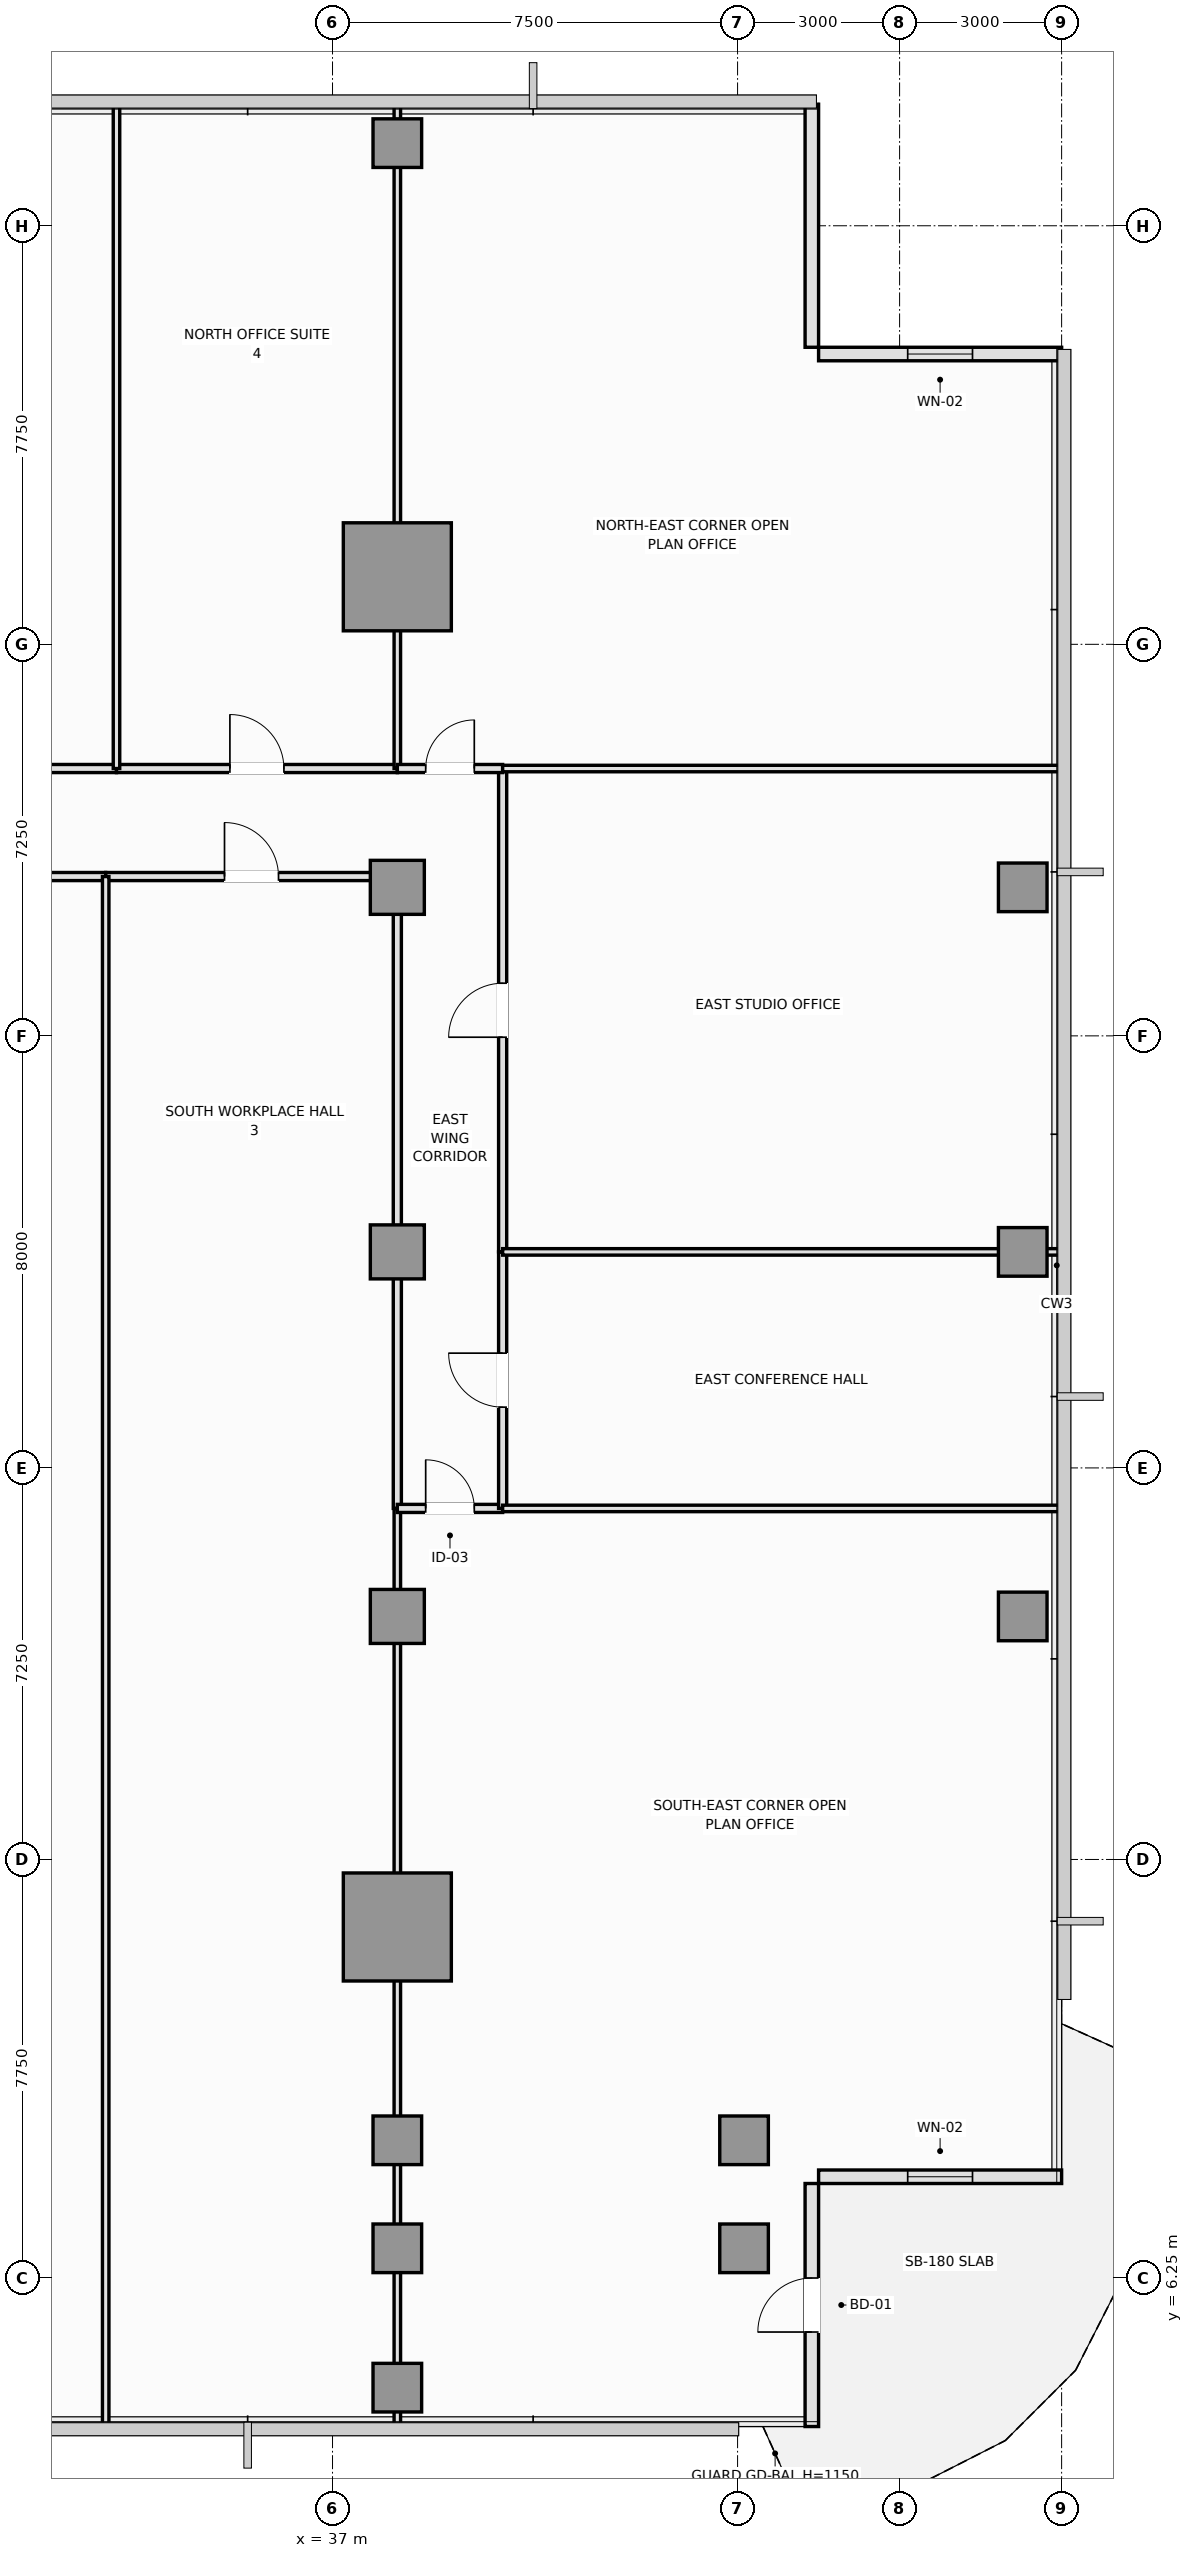
"""IFC4 building model, lengths in metres.
Left out: names, types, materials, properties, quantities, classifications, styles, units other than length and angle.
Written with IfcOpenShell. Run it as: python <this file> out.ifc"""

import sys

from ifc_helpers import new_model, si_unit, direction, frame, frame_2d, origin, origin_2d, place, context, subcontext, project, spatial, rectangle, extrude, element, fill, save


model = new_model("IFC4")
c1 = context("Model", 3, precision=1e-05, world=origin(), true_north=direction((0.0, 1.0)))
c2 = subcontext(c1, "Body", "Model", "MODEL_VIEW")
j1 = project(units=[si_unit("LENGTHUNIT", "METRE"), si_unit("PLANEANGLEUNIT", "RADIAN")], contexts=[c1])
p1 = place(None, origin())
s1 = spatial("IfcSite", under=j1, at=p1, CompositionType="ELEMENT")
p2 = place(p1, origin())
s2 = spatial("IfcBuilding", under=s1, at=p2, CompositionType="ELEMENT")
p3 = place(p2, frame((0.0, 0.0, 116.45)))
s3 = spatial("IfcBuildingStorey", under=s2, at=p3, CompositionType="ELEMENT", Elevation=116.45)
for number, where, z_axis, x_axis in (
    (1, (38.2, 12.75, 0.0), (0.0, 0.0, 1.0), (1.0, 0.0, 0.0)),
    (2, (38.2, 37.75, 0.0), (0.0, 0.0, 1.0), (1.0, 0.0, 0.0)),
):
    element("IfcColumn", number, at=place(p3, frame(where, z_axis=z_axis, x_axis=x_axis)), inside=s3, PredefinedType="COLUMN", context=c2, shape_type="SweptSolid", body=[
        extrude(rectangle(XDim=2.0, YDim=2.0, at=origin_2d()), origin(), (0.0, 0.0, 1.0), 3.55),
    ])
for number, where, z_axis, x_axis in (
    (3, (38.2, 18.5, 0.0), (0.0, 0.0, 1.0), (1.0, 0.0, 0.0)),
    (4, (38.2, 25.25, 0.0), (0.0, 0.0, 1.0), (1.0, 0.0, 0.0)),
    (5, (38.2, 32.0, 0.0), (0.0, 0.0, 1.0), (1.0, 0.0, 0.0)),
):
    element("IfcColumn", number, at=place(p3, frame(where, z_axis=z_axis, x_axis=x_axis)), inside=s3, PredefinedType="COLUMN", context=c2, shape_type="SweptSolid", body=[
        extrude(rectangle(XDim=1.0, YDim=1.0, at=origin_2d()), origin(), (0.0, 0.0, 1.0), 3.55),
    ])
for number, where, z_axis, x_axis in (
    (6, (38.2, 6.8, 0.0), (0.0, 0.0, 1.0), (1.0, 0.0, 0.0)),
    (7, (38.2, 8.8, 0.0), (0.0, 0.0, 1.0), (1.0, 0.0, 0.0)),
    (8, (44.62, 6.8, 0.0), (0.0, 0.0, 1.0), (1.0, 0.0, 0.0)),
    (9, (44.62, 8.8, 0.0), (0.0, 0.0, 1.0), (1.0, 0.0, 0.0)),
    (10, (49.78, 18.5, 0.0), (0.0, 0.0, 1.0), (1.0, 0.0, 0.0)),
    (11, (49.78, 25.25, 0.0), (0.0, 0.0, 1.0), (1.0, 0.0, 0.0)),
    (12, (49.78, 32.0, 0.0), (0.0, 0.0, 1.0), (1.0, 0.0, 0.0)),
    (13, (38.2, 4.22, 0.0), (0.0, 0.0, 1.0), (1.0, 0.0, 0.0)),
    (14, (38.2, 45.78, 0.0), (0.0, 0.0, 1.0), (1.0, 0.0, 0.0)),
):
    element("IfcColumn", number, at=place(p3, frame(where, z_axis=z_axis, x_axis=x_axis)), inside=s3, PredefinedType="COLUMN", context=c2, shape_type="SweptSolid", body=[
        extrude(rectangle(XDim=0.9, YDim=0.9, at=origin_2d()), origin(), (0.0, 0.0, 1.0), 3.55),
    ])
p4 = place(p3, frame((45.875, 3.5, 0.0), z_axis=(0.0, 0.0, 1.0), x_axis=(0.0, 1.0, 0.0)))
e15 = element("IfcWall", 15, at=p4, inside=s3, PredefinedType="SOLIDWALL", context=c2, shape_type="SweptSolid", body=[
    extrude(rectangle(XDim=4.5, YDim=0.25, at=frame_2d((2.25, 0.0))), origin(), (0.0, 0.0, 1.0), 3.07),
])
p5 = place(p4, frame((1.75, 0.0, 0.0)))
e16 = element("IfcOpeningElement", 16, at=p5, cuts=e15, PredefinedType="OPENING", context=c2, shape_type="SweptSolid", body=[
    extrude(rectangle(XDim=1.0, YDim=2.2, at=frame_2d((0.5, 1.1))), frame((0.0, 0.135, 0.0), z_axis=(0.0, -1.0, 0.0), x_axis=(1.0, 0.0, 0.0)), (0.0, 0.0, 1.0), 0.27),
])
p6 = place(p3, frame((46.0, 8.125, 0.0), z_axis=(0.0, 0.0, 1.0), x_axis=(1.0, 0.0, 0.0)))
e17 = element("IfcWall", 17, at=p6, inside=s3, PredefinedType="SOLIDWALL", context=c2, shape_type="SweptSolid", body=[
    extrude(rectangle(XDim=4.5, YDim=0.25, at=frame_2d((2.25, 0.0))), origin(), (0.0, 0.0, 1.0), 3.1),
])
p7 = place(p6, frame((1.65, 0.0, 0.9)))
e18 = element("IfcOpeningElement", 18, at=p7, cuts=e17, PredefinedType="OPENING", context=c2, shape_type="SweptSolid", body=[
    extrude(rectangle(XDim=1.2, YDim=1.8, at=frame_2d((0.6, 0.9))), frame((0.0, 0.135, 0.0), z_axis=(0.0, -1.0, 0.0), x_axis=(1.0, 0.0, 0.0)), (0.0, 0.0, 1.0), 0.27),
])
p8 = place(p3, frame((50.5, 41.875, 0.0), z_axis=(0.0, 0.0, 1.0), x_axis=(-1.0, 0.0, 0.0)))
e19 = element("IfcWall", 19, at=p8, inside=s3, PredefinedType="SOLIDWALL", context=c2, shape_type="SweptSolid", body=[
    extrude(rectangle(XDim=4.5, YDim=0.25, at=frame_2d((2.25, 0.0))), origin(), (0.0, 0.0, 1.0), 3.37),
])
p9 = place(p8, frame((1.65, 0.0, 0.9)))
e20 = element("IfcOpeningElement", 20, at=p9, cuts=e19, PredefinedType="OPENING", context=c2, shape_type="SweptSolid", body=[
    extrude(rectangle(XDim=1.2, YDim=1.8, at=frame_2d((0.6, 0.9))), frame((0.0, 0.135, 0.0), z_axis=(0.0, -1.0, 0.0), x_axis=(1.0, 0.0, 0.0)), (0.0, 0.0, 1.0), 0.27),
])
p10 = place(p3, frame((45.875, 42.0, 0.0), z_axis=(0.0, 0.0, 1.0), x_axis=(0.0, 1.0, 0.0)))
e21 = element("IfcWall", 21, at=p10, inside=s3, PredefinedType="SOLIDWALL", context=c2, shape_type="SweptSolid", body=[
    extrude(rectangle(XDim=4.5, YDim=0.25, at=frame_2d((2.25, 0.0))), origin(), (0.0, 0.0, 1.0), 3.37),
])
p11 = place(p3, frame((27.5, 32.2, 0.0), z_axis=(0.0, 0.0, 1.0), x_axis=(1.0, 0.0, 0.0)))
e22 = element("IfcWall", 22, at=p11, inside=s3, PredefinedType="PARTITIONING", context=c2, shape_type="SweptSolid", body=[
    extrude(rectangle(XDim=5.3, YDim=0.15, at=frame_2d((2.65, 0.0))), origin(), (0.0, 0.0, 1.0), 3.37),
])
p12 = place(p11, frame((2.15, 0.0, 0.0)))
e23 = element("IfcOpeningElement", 23, at=p12, cuts=e22, PredefinedType="OPENING", context=c2, shape_type="SweptSolid", body=[
    extrude(rectangle(XDim=1.0, YDim=2.15, at=frame_2d((0.5, 1.075))), frame((0.0, 0.085, 0.0), z_axis=(0.0, -1.0, 0.0), x_axis=(1.0, 0.0, 0.0)), (0.0, 0.0, 1.0), 0.17),
])
p13 = place(p3, frame((32.8, 32.2, 0.0), z_axis=(0.0, 0.0, 1.0), x_axis=(1.0, 0.0, 0.0)))
e24 = element("IfcWall", 24, at=p13, inside=s3, PredefinedType="PARTITIONING", context=c2, shape_type="SweptSolid", body=[
    extrude(rectangle(XDim=5.4, YDim=0.15, at=frame_2d((2.7, 0.0))), origin(), (0.0, 0.0, 1.0), 3.37),
])
p14 = place(p13, frame((2.2, 0.0, 0.0)))
e25 = element("IfcOpeningElement", 25, at=p14, cuts=e24, PredefinedType="OPENING", context=c2, shape_type="SweptSolid", body=[
    extrude(rectangle(XDim=1.0, YDim=2.15, at=frame_2d((0.5, 1.075))), frame((0.0, 0.085, 0.0), z_axis=(0.0, -1.0, 0.0), x_axis=(1.0, 0.0, 0.0)), (0.0, 0.0, 1.0), 0.17),
])
p15 = place(p3, frame((27.5, 34.2, 0.0), z_axis=(0.0, 0.0, 1.0), x_axis=(1.0, 0.0, 0.0)))
e26 = element("IfcWall", 26, at=p15, inside=s3, PredefinedType="PARTITIONING", context=c2, shape_type="SweptSolid", body=[
    extrude(rectangle(XDim=5.5, YDim=0.15, at=frame_2d((2.75, 0.0))), origin(), (0.0, 0.0, 1.0), 3.37),
])
p16 = place(p15, frame((2.25, 0.0, 0.0)))
e27 = element("IfcOpeningElement", 27, at=p16, cuts=e26, PredefinedType="OPENING", context=c2, shape_type="SweptSolid", body=[
    extrude(rectangle(XDim=1.0, YDim=2.15, at=frame_2d((0.5, 1.075))), frame((0.0, 0.085, 0.0), z_axis=(0.0, -1.0, 0.0), x_axis=(1.0, 0.0, 0.0)), (0.0, 0.0, 1.0), 0.17),
])
p17 = place(p3, frame((33.0, 34.2, 0.0), z_axis=(0.0, 0.0, 1.0), x_axis=(1.0, 0.0, 0.0)))
e28 = element("IfcWall", 28, at=p17, inside=s3, PredefinedType="PARTITIONING", context=c2, shape_type="SweptSolid", body=[
    extrude(rectangle(XDim=5.2, YDim=0.15, at=frame_2d((2.6, 0.0))), origin(), (0.0, 0.0, 1.0), 3.37),
])
p18 = place(p17, frame((2.1, 0.0, 0.0)))
e29 = element("IfcOpeningElement", 29, at=p18, cuts=e28, PredefinedType="OPENING", context=c2, shape_type="SweptSolid", body=[
    extrude(rectangle(XDim=1.0, YDim=2.15, at=frame_2d((0.5, 1.075))), frame((0.0, 0.085, 0.0), z_axis=(0.0, -1.0, 0.0), x_axis=(1.0, 0.0, 0.0)), (0.0, 0.0, 1.0), 0.17),
])
p19 = place(p3, frame((32.8, 3.51, 0.0), z_axis=(0.0, 0.0, 1.0), x_axis=(0.0, 1.0, 0.0)))
e30 = element("IfcWall", 30, at=p19, inside=s3, PredefinedType="PARTITIONING", context=c2, shape_type="SweptSolid", body=[
    extrude(rectangle(XDim=28.69, YDim=0.12, at=frame_2d((14.345, 0.0))), origin(), (0.0, 0.0, 1.0), 3.37),
])
p20 = place(p3, frame((38.2, 20.5, 0.0), z_axis=(0.0, 0.0, 1.0), x_axis=(0.0, 1.0, 0.0)))
e31 = element("IfcWall", 31, at=p20, inside=s3, PredefinedType="PARTITIONING", context=c2, shape_type="SweptSolid", body=[
    extrude(rectangle(XDim=11.7, YDim=0.15, at=frame_2d((5.85, 0.0))), origin(), (0.0, 0.0, 1.0), 2.87),
])
p21 = place(p3, frame((38.2, 3.51, 0.0), z_axis=(0.0, 0.0, 1.0), x_axis=(0.0, 1.0, 0.0)))
e32 = element("IfcWall", 32, at=p21, inside=s3, PredefinedType="PARTITIONING", context=c2, shape_type="SweptSolid", body=[
    extrude(rectangle(XDim=16.99, YDim=0.12, at=frame_2d((8.495, 0.0))), origin(), (0.0, 0.0, 1.0), 2.87),
])
p22 = place(p3, frame((33.0, 34.2, 0.0), z_axis=(0.0, 0.0, 1.0), x_axis=(0.0, 1.0, 0.0)))
e33 = element("IfcWall", 33, at=p22, inside=s3, PredefinedType="PARTITIONING", context=c2, shape_type="SweptSolid", body=[
    extrude(rectangle(XDim=12.29, YDim=0.12, at=frame_2d((6.145, 0.0))), origin(), (0.0, 0.0, 1.0), 3.37),
])
p23 = place(p3, frame((38.2, 34.2, 0.0), z_axis=(0.0, 0.0, 1.0), x_axis=(0.0, 1.0, 0.0)))
e34 = element("IfcWall", 34, at=p23, inside=s3, PredefinedType="PARTITIONING", context=c2, shape_type="SweptSolid", body=[
    extrude(rectangle(XDim=12.29, YDim=0.12, at=frame_2d((6.145, 0.0))), origin(), (0.0, 0.0, 1.0), 2.87),
])
p24 = place(p3, frame((38.2, 20.5, 0.0), z_axis=(0.0, 0.0, 1.0), x_axis=(1.0, 0.0, 0.0)))
e35 = element("IfcWall", 35, at=p24, inside=s3, PredefinedType="PARTITIONING", context=c2, shape_type="SweptSolid", body=[
    extrude(rectangle(XDim=1.95, YDim=0.15, at=frame_2d((0.975, 0.0))), origin(), (0.0, 0.0, 1.0), 3.37),
])
p25 = place(p24, frame((0.525, 0.0, 0.0)))
e36 = element("IfcOpeningElement", 36, at=p25, cuts=e35, PredefinedType="OPENING", context=c2, shape_type="SweptSolid", body=[
    extrude(rectangle(XDim=0.9, YDim=2.1, at=frame_2d((0.45, 1.05))), frame((0.0, 0.085, 0.0), z_axis=(0.0, -1.0, 0.0), x_axis=(1.0, 0.0, 0.0)), (0.0, 0.0, 1.0), 0.17),
])
p26 = place(p3, frame((40.15, 20.5, 0.0), z_axis=(0.0, 0.0, 1.0), x_axis=(0.0, 1.0, 0.0)))
e37 = element("IfcWall", 37, at=p26, inside=s3, PredefinedType="PARTITIONING", context=c2, shape_type="SweptSolid", body=[
    extrude(rectangle(XDim=4.75, YDim=0.15, at=frame_2d((2.375, 0.0))), origin(), (0.0, 0.0, 1.0), 3.37),
])
p27 = place(p26, frame((1.875, 0.0, 0.0)))
e38 = element("IfcOpeningElement", 38, at=p27, cuts=e37, PredefinedType="OPENING", context=c2, shape_type="SweptSolid", body=[
    extrude(rectangle(XDim=1.0, YDim=2.15, at=frame_2d((0.5, 1.075))), frame((0.0, 0.085, 0.0), z_axis=(0.0, -1.0, 0.0), x_axis=(1.0, 0.0, 0.0)), (0.0, 0.0, 1.0), 0.17),
])
p28 = place(p3, frame((40.15, 25.25, 0.0), z_axis=(0.0, 0.0, 1.0), x_axis=(0.0, 1.0, 0.0)))
e39 = element("IfcWall", 39, at=p28, inside=s3, PredefinedType="PARTITIONING", context=c2, shape_type="SweptSolid", body=[
    extrude(rectangle(XDim=8.95, YDim=0.15, at=frame_2d((4.475, 0.0))), origin(), (0.0, 0.0, 1.0), 3.37),
])
p29 = place(p28, frame((3.975, 0.0, 0.0)))
e40 = element("IfcOpeningElement", 40, at=p29, cuts=e39, PredefinedType="OPENING", context=c2, shape_type="SweptSolid", body=[
    extrude(rectangle(XDim=1.0, YDim=2.15, at=frame_2d((0.5, 1.075))), frame((0.0, 0.085, 0.0), z_axis=(0.0, -1.0, 0.0), x_axis=(1.0, 0.0, 0.0)), (0.0, 0.0, 1.0), 0.17),
])
p30 = place(p3, frame((38.2, 34.2, 0.0), z_axis=(0.0, 0.0, 1.0), x_axis=(1.0, 0.0, 0.0)))
e41 = element("IfcWall", 41, at=p30, inside=s3, PredefinedType="PARTITIONING", context=c2, shape_type="SweptSolid", body=[
    extrude(rectangle(XDim=1.95, YDim=0.15, at=frame_2d((0.975, 0.0))), origin(), (0.0, 0.0, 1.0), 3.37),
])
p31 = place(p30, frame((0.525, 0.0, 0.0)))
e42 = element("IfcOpeningElement", 42, at=p31, cuts=e41, PredefinedType="OPENING", context=c2, shape_type="SweptSolid", body=[
    extrude(rectangle(XDim=0.9, YDim=2.1, at=frame_2d((0.45, 1.05))), frame((0.0, 0.085, 0.0), z_axis=(0.0, -1.0, 0.0), x_axis=(1.0, 0.0, 0.0)), (0.0, 0.0, 1.0), 0.17),
])
p32 = place(p3, frame((40.15, 20.5, 0.0), z_axis=(0.0, 0.0, 1.0), x_axis=(1.0, 0.0, 0.0)))
e43 = element("IfcWall", 43, at=p32, inside=s3, PredefinedType="PARTITIONING", context=c2, shape_type="SweptSolid", body=[
    extrude(rectangle(XDim=10.34, YDim=0.12, at=frame_2d((5.17, 0.0))), origin(), (0.0, 0.0, 1.0), 3.37),
])
p33 = place(p3, frame((40.15, 25.25, 0.0), z_axis=(0.0, 0.0, 1.0), x_axis=(1.0, 0.0, 0.0)))
e44 = element("IfcWall", 44, at=p33, inside=s3, PredefinedType="PARTITIONING", context=c2, shape_type="SweptSolid", body=[
    extrude(rectangle(XDim=10.34, YDim=0.12, at=frame_2d((5.17, 0.0))), origin(), (0.0, 0.0, 1.0), 2.77),
])
p34 = place(p3, frame((40.15, 34.2, 0.0), z_axis=(0.0, 0.0, 1.0), x_axis=(1.0, 0.0, 0.0)))
e45 = element("IfcWall", 45, at=p34, inside=s3, PredefinedType="PARTITIONING", context=c2, shape_type="SweptSolid", body=[
    extrude(rectangle(XDim=10.34, YDim=0.12, at=frame_2d((5.17, 0.0))), origin(), (0.0, 0.0, 1.0), 3.37),
])
p35 = place(p5, frame((1.0, 0.0, 0.0), z_axis=(0.0, 0.0, 1.0), x_axis=(-1.0, 0.0, 0.0)))
e46 = element("IfcDoor", 46, at=p35, inside=s3, OperationType="SINGLE_SWING_LEFT", PredefinedType="DOOR", context=c2, shape_type="SweptSolid", body=[
    extrude(rectangle(XDim=1.0, YDim=2.2, at=frame_2d((0.5, 1.1))), frame((0.0, 0.025, 0.0), z_axis=(0.0, -1.0, 0.0), x_axis=(1.0, 0.0, 0.0)), (0.0, 0.0, 1.0), 0.05),
])
fill(e16, e46)
p36 = place(p7, origin())
e47 = element("IfcWindow", 47, at=p36, inside=s3, PartitioningType="SINGLE_PANEL", PredefinedType="WINDOW", context=c2, shape_type="SweptSolid", body=[
    extrude(rectangle(XDim=1.2, YDim=1.8, at=frame_2d((0.6, 0.9))), frame((0.0, 0.03, 0.0), z_axis=(0.0, -1.0, 0.0), x_axis=(1.0, 0.0, 0.0)), (0.0, 0.0, 1.0), 0.06),
])
fill(e18, e47)
p37 = place(p9, origin())
e48 = element("IfcWindow", 48, at=p37, inside=s3, PartitioningType="SINGLE_PANEL", PredefinedType="WINDOW", context=c2, shape_type="SweptSolid", body=[
    extrude(rectangle(XDim=1.2, YDim=1.8, at=frame_2d((0.6, 0.9))), frame((0.0, 0.03, 0.0), z_axis=(0.0, -1.0, 0.0), x_axis=(1.0, 0.0, 0.0)), (0.0, 0.0, 1.0), 0.06),
])
fill(e20, e48)
p38 = place(p14, origin())
e49 = element("IfcDoor", 49, at=p38, inside=s3, OperationType="SINGLE_SWING_LEFT", PredefinedType="DOOR", context=c2, shape_type="SweptSolid", body=[
    extrude(rectangle(XDim=1.0, YDim=2.15, at=frame_2d((0.5, 1.075))), frame((0.0, 0.025, 0.0), z_axis=(0.0, -1.0, 0.0), x_axis=(1.0, 0.0, 0.0)), (0.0, 0.0, 1.0), 0.05),
])
fill(e25, e49)
p39 = place(p18, origin())
e50 = element("IfcDoor", 50, at=p39, inside=s3, OperationType="SINGLE_SWING_LEFT", PredefinedType="DOOR", context=c2, shape_type="SweptSolid", body=[
    extrude(rectangle(XDim=1.0, YDim=2.15, at=frame_2d((0.5, 1.075))), frame((0.0, 0.025, 0.0), z_axis=(0.0, -1.0, 0.0), x_axis=(1.0, 0.0, 0.0)), (0.0, 0.0, 1.0), 0.05),
])
fill(e29, e50)
p40 = place(p25, origin())
e51 = element("IfcDoor", 51, at=p40, inside=s3, OperationType="SINGLE_SWING_LEFT", PredefinedType="DOOR", context=c2, shape_type="SweptSolid", body=[
    extrude(rectangle(XDim=0.9, YDim=2.1, at=frame_2d((0.45, 1.05))), frame((0.0, 0.025, 0.0), z_axis=(0.0, -1.0, 0.0), x_axis=(1.0, 0.0, 0.0)), (0.0, 0.0, 1.0), 0.05),
])
fill(e36, e51)
p41 = place(p27, origin())
e52 = element("IfcDoor", 52, at=p41, inside=s3, OperationType="SINGLE_SWING_RIGHT", PredefinedType="DOOR", context=c2, shape_type="SweptSolid", body=[
    extrude(rectangle(XDim=1.0, YDim=2.15, at=frame_2d((0.5, 1.075))), frame((0.0, 0.025, 0.0), z_axis=(0.0, -1.0, 0.0), x_axis=(1.0, 0.0, 0.0)), (0.0, 0.0, 1.0), 0.05),
])
fill(e38, e52)
p42 = place(p29, origin())
e53 = element("IfcDoor", 53, at=p42, inside=s3, OperationType="SINGLE_SWING_LEFT", PredefinedType="DOOR", context=c2, shape_type="SweptSolid", body=[
    extrude(rectangle(XDim=1.0, YDim=2.15, at=frame_2d((0.5, 1.075))), frame((0.0, 0.025, 0.0), z_axis=(0.0, -1.0, 0.0), x_axis=(1.0, 0.0, 0.0)), (0.0, 0.0, 1.0), 0.05),
])
fill(e40, e53)
p43 = place(p31, origin())
e54 = element("IfcDoor", 54, at=p43, inside=s3, OperationType="SINGLE_SWING_RIGHT", PredefinedType="DOOR", context=c2, shape_type="SweptSolid", body=[
    extrude(rectangle(XDim=0.9, YDim=2.1, at=frame_2d((0.45, 1.05))), frame((0.0, 0.025, 0.0), z_axis=(0.0, -1.0, 0.0), x_axis=(1.0, 0.0, 0.0)), (0.0, 0.0, 1.0), 0.05),
])
fill(e42, e54)
save(model, sys.argv[1])
